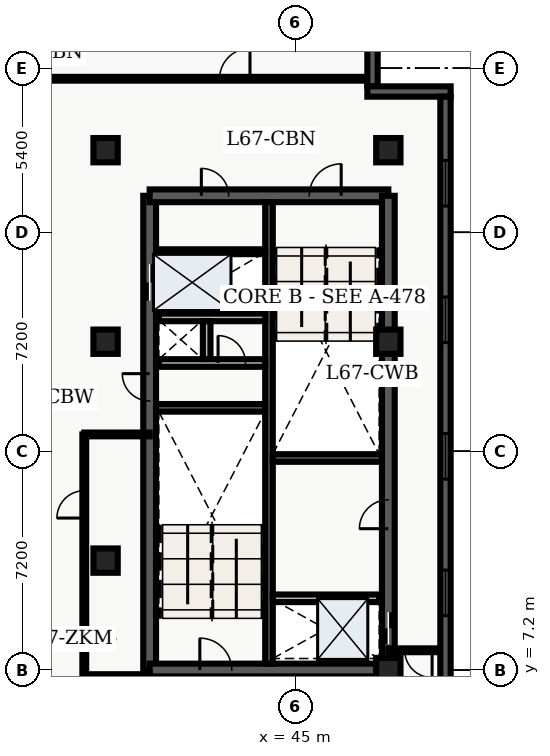
"""IFC4 building model, lengths in metres.
Left out: names, types, materials, properties, quantities, classifications, styles, units other than length and angle.
Written with IfcOpenShell. Run it as: python <this file> out.ifc"""

import sys

from ifc_helpers import new_model, entity, si_unit, converted_unit, direction, frame, origin_with_axes, origin_2d_with_axis, place, context, subcontext, project, spatial, polyline, rectangle, outline, extrude, element, fill, save


model = new_model("IFC4")
c1 = context("Model", 3, precision=1e-05, world=origin_with_axes(), true_north=direction((0.0, 1.0)))
c2 = subcontext(c1, "Body", "Model", "MODEL_VIEW")
j1 = project(units=[si_unit("LENGTHUNIT", "METRE"), converted_unit("PLANEANGLEUNIT", "DEGREE", entity("IfcPlaneAngleMeasure", 0.017), si_unit("PLANEANGLEUNIT", "RADIAN"), dimensions=[0, 0, 0, 0, 0, 0, 0])], contexts=[c1])
p1 = place(None, origin_with_axes())
s1 = spatial("IfcSite", under=j1, at=p1, CompositionType="ELEMENT")
p2 = place(p1, origin_with_axes())
s2 = spatial("IfcBuilding", under=s1, at=p2, CompositionType="ELEMENT")
p3 = place(p2, frame((0.0, 0.0, 272.4), z_axis=(0.0, 0.0, 1.0), x_axis=(1.0, 0.0, 0.0)))
s3 = spatial("IfcBuildingStorey", under=s2, at=p3, CompositionType="ELEMENT", Elevation=272.4)
p4 = place(p3, frame((40.2, 7.2, 0.0), z_axis=(0.0, 0.0, 1.0), x_axis=(0.0, 1.0, 0.0)))
e1 = element("IfcWall", 1, at=p4, inside=s3, PredefinedType="SHEAR", context=c2, shape_type="SweptSolid", body=[
    extrude(outline(polyline([(0.0, -0.21), (15.6, -0.21), (15.6, 0.21), (0.0, 0.21), (0.0, -0.21)])), origin_with_axes(), (0.0, 0.0, 1.0), 3.66),
])
p5 = place(p4, frame((12.75, 0.0, 0.0), z_axis=(0.0, 0.0, 1.0), x_axis=(1.0, 0.0, 0.0)))
e2 = element("IfcOpeningElement", 2, at=p5, cuts=e1, PredefinedType="OPENING", context=c2, shape_type="SweptSolid", body=[
    extrude(rectangle(XDim=1.2, YDim=0.44, at=origin_2d_with_axis()), origin_with_axes(), (0.0, 0.0, 1.0), 2.15),
])
p6 = place(p4, frame((9.3, 0.0, 0.0), z_axis=(0.0, 0.0, 1.0), x_axis=(1.0, 0.0, 0.0)))
e3 = element("IfcOpeningElement", 3, at=p6, cuts=e1, PredefinedType="OPENING", context=c2, shape_type="SweptSolid", body=[
    extrude(rectangle(XDim=0.9, YDim=0.44, at=origin_2d_with_axis()), origin_with_axes(), (0.0, 0.0, 1.0), 2.15),
])
p7 = place(p3, frame((40.2, 7.2, 0.0), z_axis=(0.0, 0.0, 1.0), x_axis=(1.0, 0.0, 0.0)))
e4 = element("IfcWall", 4, at=p7, inside=s3, PredefinedType="SHEAR", context=c2, shape_type="SweptSolid", body=[
    extrude(outline(polyline([(0.0, -0.21), (7.85, -0.21), (7.85, 0.21), (0.0, 0.21), (0.0, -0.21)])), origin_with_axes(), (0.0, 0.0, 1.0), 3.66),
])
p8 = place(p7, frame((2.175, 0.0, 0.0), z_axis=(0.0, 0.0, 1.0), x_axis=(1.0, 0.0, 0.0)))
e5 = element("IfcOpeningElement", 5, at=p8, cuts=e4, PredefinedType="OPENING", context=c2, shape_type="SweptSolid", body=[
    extrude(rectangle(XDim=1.05, YDim=0.44, at=origin_2d_with_axis()), origin_with_axes(), (0.0, 0.0, 1.0), 2.15),
])
p9 = place(p3, frame((40.2, 22.8, 0.0), z_axis=(0.0, 0.0, 1.0), x_axis=(1.0, 0.0, 0.0)))
e6 = element("IfcWall", 6, at=p9, inside=s3, PredefinedType="SHEAR", context=c2, shape_type="SweptSolid", body=[
    extrude(outline(polyline([(0.0, -0.21), (7.85, -0.21), (7.85, 0.21), (0.0, 0.21), (0.0, -0.21)])), origin_with_axes(), (0.0, 0.0, 1.0), 3.66),
])
p10 = place(p9, frame((5.775, 0.0, 0.0), z_axis=(0.0, 0.0, 1.0), x_axis=(1.0, 0.0, 0.0)))
e7 = element("IfcOpeningElement", 7, at=p10, cuts=e6, PredefinedType="OPENING", context=c2, shape_type="SweptSolid", body=[
    extrude(rectangle(XDim=1.05, YDim=0.44, at=origin_2d_with_axis()), origin_with_axes(), (0.0, 0.0, 1.0), 2.15),
])
p11 = place(p9, frame((2.15, 0.0, 0.0), z_axis=(0.0, 0.0, 1.0), x_axis=(1.0, 0.0, 0.0)))
e8 = element("IfcOpeningElement", 8, at=p11, cuts=e6, PredefinedType="OPENING", context=c2, shape_type="SweptSolid", body=[
    extrude(rectangle(XDim=0.9, YDim=0.44, at=origin_2d_with_axis()), origin_with_axes(), (0.0, 0.0, 1.0), 2.15),
])
p12 = place(p3, frame((48.05, 7.2, 0.0), z_axis=(0.0, 0.0, 1.0), x_axis=(0.0, 1.0, 0.0)))
e9 = element("IfcWall", 9, at=p12, inside=s3, PredefinedType="SHEAR", context=c2, shape_type="SweptSolid", body=[
    extrude(outline(polyline([(0.0, -0.21), (15.6, -0.21), (15.6, 0.21), (0.0, 0.21), (0.0, -0.21)])), origin_with_axes(), (0.0, 0.0, 1.0), 3.66),
])
p13 = place(p12, frame((1.375, 0.0, 0.0), z_axis=(0.0, 0.0, 1.0), x_axis=(1.0, 0.0, 0.0)))
e10 = element("IfcOpeningElement", 10, at=p13, cuts=e9, PredefinedType="OPENING", context=c2, shape_type="SweptSolid", body=[
    extrude(rectangle(XDim=1.05, YDim=0.44, at=origin_2d_with_axis()), origin_with_axes(), (0.0, 0.0, 1.0), 2.15),
])
p14 = place(p12, frame((5.125, 0.0, 0.0), z_axis=(0.0, 0.0, 1.0), x_axis=(1.0, 0.0, 0.0)))
e11 = element("IfcOpeningElement", 11, at=p14, cuts=e9, PredefinedType="OPENING", context=c2, shape_type="SweptSolid", body=[
    extrude(rectangle(XDim=0.95, YDim=0.44, at=origin_2d_with_axis()), origin_with_axes(), (0.0, 0.0, 1.0), 2.15),
])
p15 = place(p3, frame((44.125, 7.41, 0.0), z_axis=(0.0, 0.0, 1.0), x_axis=(0.0, 1.0, 0.0)))
e12 = element("IfcWall", 12, at=p15, inside=s3, PredefinedType="SHEAR", context=c2, shape_type="SweptSolid", body=[
    extrude(outline(polyline([(0.0, -0.125), (15.18, -0.125), (15.18, 0.125), (0.0, 0.125), (0.0, -0.125)])), origin_with_axes(), (0.0, 0.0, 1.0), 3.66),
])
for number, where, z_axis, x_axis in (
    (13, (40.41, 15.825, 0.0), (0.0, 0.0, 1.0), (1.0, 0.0, 0.0)),
    (14, (44.25, 14.175, 0.0), (0.0, 0.0, 1.0), (1.0, 0.0, 0.0)),
):
    element("IfcWall", number, at=place(p3, frame(where, z_axis=z_axis, x_axis=x_axis)), inside=s3, PredefinedType="SHEAR", context=c2, shape_type="SweptSolid", body=[
        extrude(outline(polyline([(0.0, -0.125), (3.59, -0.125), (3.59, 0.125), (0.0, 0.125), (0.0, -0.125)])), origin_with_axes(), (0.0, 0.0, 1.0), 3.66),
    ])
p16 = place(p3, frame((40.5, 17.3, 0.0), z_axis=(0.0, 0.0, 1.0), x_axis=(1.0, 0.0, 0.0)))
e15 = element("IfcWall", 15, at=p16, inside=s3, PredefinedType="SOLIDWALL", context=c2, shape_type="SweptSolid", body=[
    extrude(outline(polyline([(0.0, -0.125), (3.5, -0.125), (3.5, 0.125), (0.0, 0.125), (0.0, -0.125)])), origin_with_axes(), (0.0, 0.0, 1.0), 2.7),
])
p17 = place(p16, frame((2.4, 0.0, 0.0), z_axis=(0.0, 0.0, 1.0), x_axis=(1.0, 0.0, 0.0)))
e16 = element("IfcOpeningElement", 16, at=p17, cuts=e15, PredefinedType="OPENING", context=c2, shape_type="SweptSolid", body=[
    extrude(rectangle(XDim=0.9, YDim=0.27, at=origin_2d_with_axis()), origin_with_axes(), (0.0, 0.0, 1.0), 2.15),
])
p18 = place(p3, frame((40.5, 18.8, 0.0), z_axis=(0.0, 0.0, 1.0), x_axis=(1.0, 0.0, 0.0)))
e17 = element("IfcWall", 17, at=p18, inside=s3, PredefinedType="SOLIDWALL", context=c2, shape_type="SweptSolid", body=[
    extrude(outline(polyline([(0.0, -0.125), (3.5, -0.125), (3.5, 0.125), (0.0, 0.125), (0.0, -0.125)])), origin_with_axes(), (0.0, 0.0, 1.0), 2.7),
])
p19 = place(p3, frame((42.075, 17.43, 0.0), z_axis=(0.0, 0.0, 1.0), x_axis=(0.0, 1.0, 0.0)))
e18 = element("IfcWall", 18, at=p19, inside=s3, PredefinedType="SOLIDWALL", context=c2, shape_type="SweptSolid", body=[
    extrude(outline(polyline([(0.0, -0.125), (1.24, -0.125), (1.24, 0.125), (0.0, 0.125), (0.0, -0.125)])), origin_with_axes(), (0.0, 0.0, 1.0), 2.7),
])
for number, where, z_axis, x_axis in (
    (19, (38.75, 10.8, 0.0), (0.0, 0.0, 1.0), (1.0, 0.0, 0.0)),
    (20, (38.75, 18.0, 0.0), (0.0, 0.0, 1.0), (1.0, 0.0, 0.0)),
    (21, (38.75, 24.3, 0.0), (0.0, 0.0, 1.0), (1.0, 0.0, 0.0)),
    (22, (48.05, 7.2, 0.0), (0.0, 0.0, 1.0), (1.0, 0.0, 0.0)),
    (23, (48.05, 18.0, 0.0), (0.0, 0.0, 1.0), (1.0, 0.0, 0.0)),
    (24, (48.05, 24.3, 0.0), (0.0, 0.0, 1.0), (1.0, 0.0, 0.0)),
):
    element("IfcColumn", number, at=place(p3, frame(where, z_axis=z_axis, x_axis=x_axis)), inside=s3, PredefinedType="COLUMN", context=c2, shape_type="SweptSolid", body=[
        extrude(rectangle(XDim=0.8, YDim=0.8, at=origin_2d_with_axis()), origin_with_axes(), (0.0, 0.0, 1.0), 3.9),
    ])
p20 = place(p3, frame((40.5, 20.96, 0.0), z_axis=(0.0, 0.0, 1.0), x_axis=(1.0, 0.0, 0.0)))
e25 = element("IfcWall", 25, at=p20, inside=s3, PredefinedType="PARTITIONING", context=c2, shape_type="SweptSolid", body=[
    extrude(outline(polyline([(0.0, -0.08), (3.5, -0.08), (3.5, 0.08), (0.0, 0.08), (0.0, -0.08)])), origin_with_axes(), (0.0, 0.0, 1.0), 2.7),
])
p21 = place(p3, frame((44.25, 9.56, 0.0), z_axis=(0.0, 0.0, 1.0), x_axis=(1.0, 0.0, 0.0)))
e26 = element("IfcWall", 26, at=p21, inside=s3, PredefinedType="SOLIDWALL", context=c2, shape_type="SweptSolid", body=[
    extrude(outline(polyline([(0.0, -0.125), (3.5, -0.125), (3.5, 0.125), (0.0, 0.125), (0.0, -0.125)])), origin_with_axes(), (0.0, 0.0, 1.0), 2.7),
])
p22 = place(p3, frame((49.765, 7.85, 0.0), z_axis=(0.0, 0.0, 1.0), x_axis=(-1.0, 0.0, 0.0)))
e27 = element("IfcWall", 27, at=p22, inside=s3, PredefinedType="PARTITIONING", context=c2, shape_type="SweptSolid", body=[
    extrude(outline(polyline([(0.0, -0.062), (1.715, -0.062), (1.715, 0.062), (0.0, 0.062), (0.0, -0.062)])), origin_with_axes(), (0.0, 0.0, 1.0), 2.7),
])
p23 = place(p22, frame((0.725, 0.0, 0.0), z_axis=(0.0, 0.0, 1.0), x_axis=(1.0, 0.0, 0.0)))
e28 = element("IfcOpeningElement", 28, at=p23, cuts=e27, PredefinedType="OPENING", context=c2, shape_type="SweptSolid", body=[
    extrude(rectangle(XDim=0.9, YDim=0.145, at=origin_2d_with_axis()), origin_with_axes(), (0.0, 0.0, 1.0), 2.15),
])
p24 = place(p3, frame((34.535, 26.65, 0.0), z_axis=(0.0, 0.0, 1.0), x_axis=(1.0, 0.0, 0.0)))
e29 = element("IfcWall", 29, at=p24, inside=s3, PredefinedType="PARTITIONING", context=c2, shape_type="SweptSolid", body=[
    extrude(outline(polyline([(0.0, -0.062), (12.995, -0.062), (12.995, 0.062), (0.0, 0.062), (0.0, -0.062)])), origin_with_axes(), (0.0, 0.0, 1.0), 2.7),
])
p25 = place(p24, frame((8.465, 0.0, 0.0), z_axis=(0.0, 0.0, 1.0), x_axis=(1.0, 0.0, 0.0)))
e30 = element("IfcOpeningElement", 30, at=p25, cuts=e29, PredefinedType="OPENING", context=c2, shape_type="SweptSolid", body=[
    extrude(rectangle(XDim=1.0, YDim=0.145, at=origin_2d_with_axis()), origin_with_axes(), (0.0, 0.0, 1.0), 2.15),
])
for number, where, z_axis, x_axis in (
    (31, (38.05, 7.0, 0.0), (0.0, 0.0, 1.0), (1.0, 0.0, 0.0)),
    (32, (38.05, 14.95, 0.0), (0.0, 0.0, 1.0), (1.0, 0.0, 0.0)),
):
    element("IfcWall", number, at=place(p3, frame(where, z_axis=z_axis, x_axis=x_axis)), inside=s3, PredefinedType="PARTITIONING", context=c2, shape_type="SweptSolid", body=[
        extrude(outline(polyline([(0.0, -0.062), (2.15, -0.062), (2.15, 0.062), (0.0, 0.062), (0.0, -0.062)])), origin_with_axes(), (0.0, 0.0, 1.0), 2.7),
    ])
p26 = place(p3, frame((38.05, 7.0, 0.0), z_axis=(0.0, 0.0, 1.0), x_axis=(0.0, 1.0, 0.0)))
e33 = element("IfcWall", 33, at=p26, inside=s3, PredefinedType="PARTITIONING", context=c2, shape_type="SweptSolid", body=[
    extrude(outline(polyline([(0.0, -0.062), (7.95, -0.062), (7.95, 0.062), (0.0, 0.062), (0.0, -0.062)])), origin_with_axes(), (0.0, 0.0, 1.0), 2.7),
])
p27 = place(p26, frame((5.65, 0.0, 0.0), z_axis=(0.0, 0.0, 1.0), x_axis=(1.0, 0.0, 0.0)))
e34 = element("IfcOpeningElement", 34, at=p27, cuts=e33, PredefinedType="OPENING", context=c2, shape_type="SweptSolid", body=[
    extrude(rectangle(XDim=0.9, YDim=0.145, at=origin_2d_with_axis()), origin_with_axes(), (0.0, 0.0, 1.0), 2.15),
])
p28 = place(p3, frame((47.53, 28.46, 0.0), z_axis=(0.0, 0.0, 1.0), x_axis=(0.0, -1.0, 0.0)))
e35 = element("IfcWall", 35, at=p28, inside=s3, PredefinedType="SOLIDWALL", context=c2, shape_type="SweptSolid", body=[
    extrude(outline(polyline([(0.0, -0.17), (2.06, -0.17), (2.06, 0.17), (0.0, 0.17), (0.0, -0.17)])), origin_with_axes(), (0.0, 0.0, 1.0), 3.66),
])
p29 = place(p3, frame((47.36, 26.23, 0.0), z_axis=(0.0, 0.0, 1.0), x_axis=(1.0, 0.0, 0.0)))
e36 = element("IfcWall", 36, at=p29, inside=s3, PredefinedType="SOLIDWALL", context=c2, shape_type="SweptSolid", body=[
    extrude(outline(polyline([(0.0, -0.17), (2.74, -0.17), (2.74, 0.17), (0.0, 0.17), (0.0, -0.17)])), origin_with_axes(), (0.0, 0.0, 1.0), 3.66),
])
p30 = place(p3, frame((49.93, 26.06, 0.0), z_axis=(0.0, 0.0, 1.0), x_axis=(0.0, -1.0, 0.0)))
e37 = element("IfcWall", 37, at=p30, inside=s3, PredefinedType="SOLIDWALL", context=c2, shape_type="SweptSolid", body=[
    extrude(outline(polyline([(0.0, -0.17), (23.66, -0.17), (23.66, 0.17), (0.0, 0.17), (0.0, -0.17)])), origin_with_axes(), (0.0, 0.0, 1.0), 3.66),
])
p31 = place(p30, frame((2.846, 0.0, 0.45), z_axis=(0.0, 0.0, 1.0), x_axis=(1.0, 0.0, 0.0)))
e38 = element("IfcOpeningElement", 38, at=p31, cuts=e37, PredefinedType="OPENING", context=c2, shape_type="SweptSolid", body=[
    extrude(rectangle(XDim=1.5, YDim=0.36, at=origin_2d_with_axis()), origin_with_axes(), (0.0, 0.0, 1.0), 2.1),
])
p32 = place(p30, frame((7.338, 0.0, 0.45), z_axis=(0.0, 0.0, 1.0), x_axis=(1.0, 0.0, 0.0)))
e39 = element("IfcOpeningElement", 39, at=p32, cuts=e37, PredefinedType="OPENING", context=c2, shape_type="SweptSolid", body=[
    extrude(rectangle(XDim=1.5, YDim=0.36, at=origin_2d_with_axis()), origin_with_axes(), (0.0, 0.0, 1.0), 2.1),
])
p33 = place(p30, frame((11.83, 0.0, 0.45), z_axis=(0.0, 0.0, 1.0), x_axis=(1.0, 0.0, 0.0)))
e40 = element("IfcOpeningElement", 40, at=p33, cuts=e37, PredefinedType="OPENING", context=c2, shape_type="SweptSolid", body=[
    extrude(rectangle(XDim=1.5, YDim=0.36, at=origin_2d_with_axis()), origin_with_axes(), (0.0, 0.0, 1.0), 2.1),
])
p34 = place(p30, frame((16.322, 0.0, 0.45), z_axis=(0.0, 0.0, 1.0), x_axis=(1.0, 0.0, 0.0)))
e41 = element("IfcOpeningElement", 41, at=p34, cuts=e37, PredefinedType="OPENING", context=c2, shape_type="SweptSolid", body=[
    extrude(rectangle(XDim=1.5, YDim=0.36, at=origin_2d_with_axis()), origin_with_axes(), (0.0, 0.0, 1.0), 2.1),
])
p35 = place(p30, frame((20.814, 0.0, 0.45), z_axis=(0.0, 0.0, 1.0), x_axis=(1.0, 0.0, 0.0)))
e42 = element("IfcOpeningElement", 42, at=p35, cuts=e37, PredefinedType="OPENING", context=c2, shape_type="SweptSolid", body=[
    extrude(rectangle(XDim=1.5, YDim=0.36, at=origin_2d_with_axis()), origin_with_axes(), (0.0, 0.0, 1.0), 2.1),
])
p36 = place(p12, frame((1.375, 0.0, 0.0), z_axis=(0.0, 0.0, 1.0), x_axis=(1.0, 0.0, 0.0)))
e43 = element("IfcDoor", 43, at=p36, inside=s3, OperationType="SLIDING_TO_LEFT", PredefinedType="DOOR", context=c2, shape_type="SweptSolid", body=[
    extrude(rectangle(XDim=1.05, YDim=0.09, at=origin_2d_with_axis()), origin_with_axes(), (0.0, 0.0, 1.0), 2.15),
])
fill(e10, e43)
p37 = place(p4, frame((12.75, 0.0, 0.0), z_axis=(0.0, 0.0, 1.0), x_axis=(1.0, 0.0, 0.0)))
e44 = element("IfcDoor", 44, at=p37, inside=s3, OperationType="DOUBLE_DOOR_SLIDING", PredefinedType="DOOR", context=c2, shape_type="SweptSolid", body=[
    extrude(rectangle(XDim=1.2, YDim=0.09, at=origin_2d_with_axis()), origin_with_axes(), (0.0, 0.0, 1.0), 2.15),
])
fill(e2, e44)
p38 = place(p4, frame((9.3, 0.0, 0.0), z_axis=(0.0, 0.0, 1.0), x_axis=(1.0, 0.0, 0.0)))
e45 = element("IfcDoor", 45, at=p38, inside=s3, OperationType="SINGLE_SWING_RIGHT", PredefinedType="DOOR", context=c2, shape_type="SweptSolid", body=[
    extrude(rectangle(XDim=0.9, YDim=0.09, at=origin_2d_with_axis()), origin_with_axes(), (0.0, 0.0, 1.0), 2.15),
])
fill(e3, e45)
p39 = place(p16, frame((2.4, 0.0, 0.0), z_axis=(0.0, 0.0, 1.0), x_axis=(1.0, 0.0, 0.0)))
e46 = element("IfcDoor", 46, at=p39, inside=s3, OperationType="SINGLE_SWING_LEFT", PredefinedType="DOOR", context=c2, shape_type="SweptSolid", body=[
    extrude(rectangle(XDim=0.9, YDim=0.09, at=origin_2d_with_axis()), origin_with_axes(), (0.0, 0.0, 1.0), 2.15),
])
fill(e16, e46)
p40 = place(p7, frame((2.175, 0.0, 0.0), z_axis=(0.0, 0.0, 1.0), x_axis=(1.0, 0.0, 0.0)))
e47 = element("IfcDoor", 47, at=p40, inside=s3, OperationType="SINGLE_SWING_LEFT", PredefinedType="DOOR", context=c2, shape_type="SweptSolid", body=[
    extrude(rectangle(XDim=1.05, YDim=0.09, at=origin_2d_with_axis()), origin_with_axes(), (0.0, 0.0, 1.0), 2.15),
])
fill(e5, e47)
p41 = place(p9, frame((5.775, 0.0, 0.0), z_axis=(0.0, 0.0, 1.0), x_axis=(1.0, 0.0, 0.0)))
e48 = element("IfcDoor", 48, at=p41, inside=s3, OperationType="SINGLE_SWING_RIGHT", PredefinedType="DOOR", context=c2, shape_type="SweptSolid", body=[
    extrude(rectangle(XDim=1.05, YDim=0.09, at=origin_2d_with_axis()), origin_with_axes(), (0.0, 0.0, 1.0), 2.15),
])
fill(e7, e48)
p42 = place(p9, frame((2.15, 0.0, 0.0), z_axis=(0.0, 0.0, 1.0), x_axis=(1.0, 0.0, 0.0)))
e49 = element("IfcDoor", 49, at=p42, inside=s3, OperationType="SINGLE_SWING_LEFT", PredefinedType="DOOR", context=c2, shape_type="SweptSolid", body=[
    extrude(rectangle(XDim=0.9, YDim=0.09, at=origin_2d_with_axis()), origin_with_axes(), (0.0, 0.0, 1.0), 2.15),
])
fill(e8, e49)
p43 = place(p12, frame((5.125, 0.0, 0.0), z_axis=(0.0, 0.0, 1.0), x_axis=(1.0, 0.0, 0.0)))
e50 = element("IfcDoor", 50, at=p43, inside=s3, OperationType="SINGLE_SWING_LEFT", PredefinedType="DOOR", context=c2, shape_type="SweptSolid", body=[
    extrude(rectangle(XDim=0.95, YDim=0.09, at=origin_2d_with_axis()), origin_with_axes(), (0.0, 0.0, 1.0), 2.15),
])
fill(e11, e50)
p44 = place(p22, frame((0.725, 0.0, 0.0), z_axis=(0.0, 0.0, 1.0), x_axis=(1.0, 0.0, 0.0)))
e51 = element("IfcDoor", 51, at=p44, inside=s3, OperationType="SINGLE_SWING_LEFT", PredefinedType="DOOR", context=c2, shape_type="SweptSolid", body=[
    extrude(rectangle(XDim=0.9, YDim=0.075, at=origin_2d_with_axis()), origin_with_axes(), (0.0, 0.0, 1.0), 2.15),
])
fill(e28, e51)
p45 = place(p24, frame((8.465, 0.0, 0.0), z_axis=(0.0, 0.0, 1.0), x_axis=(1.0, 0.0, 0.0)))
e52 = element("IfcDoor", 52, at=p45, inside=s3, OperationType="SINGLE_SWING_RIGHT", PredefinedType="DOOR", context=c2, shape_type="SweptSolid", body=[
    extrude(rectangle(XDim=1.0, YDim=0.075, at=origin_2d_with_axis()), origin_with_axes(), (0.0, 0.0, 1.0), 2.15),
])
fill(e30, e52)
p46 = place(p26, frame((5.65, 0.0, 0.0), z_axis=(0.0, 0.0, 1.0), x_axis=(1.0, 0.0, 0.0)))
e53 = element("IfcDoor", 53, at=p46, inside=s3, OperationType="SINGLE_SWING_LEFT", PredefinedType="DOOR", context=c2, shape_type="SweptSolid", body=[
    extrude(rectangle(XDim=0.9, YDim=0.075, at=origin_2d_with_axis()), origin_with_axes(), (0.0, 0.0, 1.0), 2.15),
])
fill(e34, e53)
p47 = place(p30, frame((2.846, 0.0, 0.45), z_axis=(0.0, 0.0, 1.0), x_axis=(1.0, 0.0, 0.0)))
e54 = element("IfcWindow", 54, at=p47, inside=s3, PredefinedType="WINDOW", context=c2, shape_type="SweptSolid", body=[
    extrude(rectangle(XDim=1.5, YDim=0.09, at=origin_2d_with_axis()), origin_with_axes(), (0.0, 0.0, 1.0), 2.1),
])
fill(e38, e54)
p48 = place(p30, frame((7.338, 0.0, 0.45), z_axis=(0.0, 0.0, 1.0), x_axis=(1.0, 0.0, 0.0)))
e55 = element("IfcWindow", 55, at=p48, inside=s3, PredefinedType="WINDOW", context=c2, shape_type="SweptSolid", body=[
    extrude(rectangle(XDim=1.5, YDim=0.09, at=origin_2d_with_axis()), origin_with_axes(), (0.0, 0.0, 1.0), 2.1),
])
fill(e39, e55)
p49 = place(p30, frame((11.83, 0.0, 0.45), z_axis=(0.0, 0.0, 1.0), x_axis=(1.0, 0.0, 0.0)))
e56 = element("IfcWindow", 56, at=p49, inside=s3, PredefinedType="WINDOW", context=c2, shape_type="SweptSolid", body=[
    extrude(rectangle(XDim=1.5, YDim=0.09, at=origin_2d_with_axis()), origin_with_axes(), (0.0, 0.0, 1.0), 2.1),
])
fill(e40, e56)
p50 = place(p30, frame((16.322, 0.0, 0.45), z_axis=(0.0, 0.0, 1.0), x_axis=(1.0, 0.0, 0.0)))
e57 = element("IfcWindow", 57, at=p50, inside=s3, PredefinedType="WINDOW", context=c2, shape_type="SweptSolid", body=[
    extrude(rectangle(XDim=1.5, YDim=0.09, at=origin_2d_with_axis()), origin_with_axes(), (0.0, 0.0, 1.0), 2.1),
])
fill(e41, e57)
save(model, sys.argv[1])
